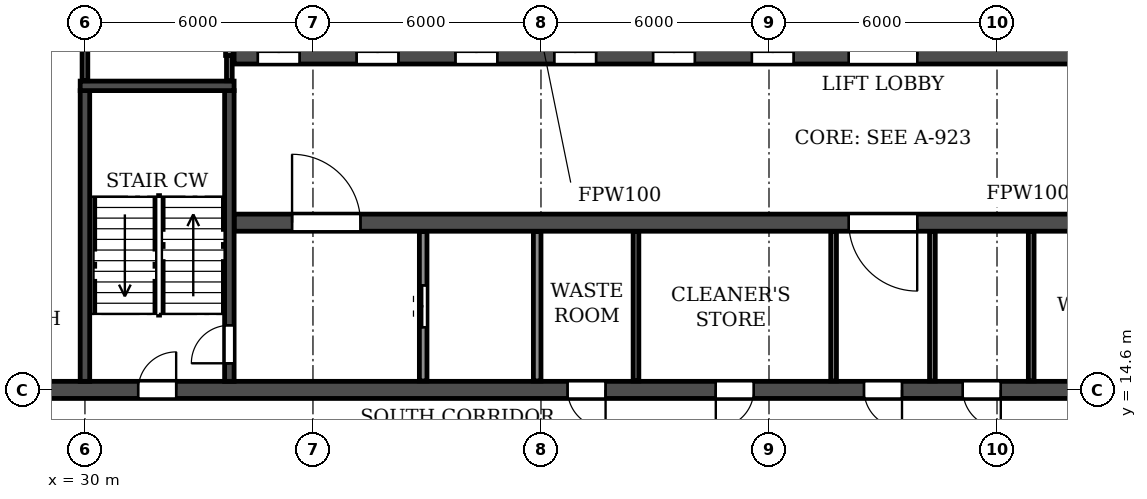
"""IFC4 building model, lengths in metres.
Left out: names, types, materials, properties, quantities, classifications, styles, units other than length and angle.
Written with IfcOpenShell. Run it as: python <this file> out.ifc"""

import sys

from ifc_helpers import new_model, si_unit, direction, frame, frame_2d, origin, place, context, subcontext, project, spatial, rectangle, extrude, element, fill, save


model = new_model("IFC4")
c1 = context("Model", 3, precision=1e-05, world=origin(), true_north=direction((0.0, 1.0)))
c2 = subcontext(c1, "Body", "Model", "MODEL_VIEW")
j1 = project(units=[si_unit("LENGTHUNIT", "METRE"), si_unit("PLANEANGLEUNIT", "RADIAN")], contexts=[c1])
p1 = place(None, origin())
s1 = spatial("IfcSite", under=j1, at=p1, CompositionType="ELEMENT")
p2 = place(p1, origin())
s2 = spatial("IfcBuilding", under=s1, at=p2, CompositionType="ELEMENT")
p3 = place(p2, frame((0.0, 0.0, 122.4)))
s3 = spatial("IfcBuildingStorey", under=s2, at=p3, CompositionType="ELEMENT", Elevation=122.4)
p4 = place(p3, frame((12.2, 14.6, 0.0), z_axis=(0.0, 0.0, 1.0), x_axis=(1.0, 0.0, 0.0)))
e1 = element("IfcWall", 1, at=p4, inside=s3, PredefinedType="SOLIDWALL", context=c2, shape_type="SweptSolid", body=[
    extrude(rectangle(XDim=77.6, YDim=0.45, at=frame_2d((38.8, 0.0))), origin(), (0.0, 0.0, 1.0), 3.07),
])
p5 = place(p4, frame((0.8, 0.0, 0.0)))
e2 = element("IfcOpeningElement", 2, at=p5, cuts=e1, PredefinedType="OPENING", context=c2, shape_type="SweptSolid", body=[
    extrude(rectangle(XDim=1.0, YDim=2.1, at=frame_2d((0.5, 1.05))), frame((0.0, 0.235, 0.0), z_axis=(0.0, -1.0, 0.0), x_axis=(1.0, 0.0, 0.0)), (0.0, 0.0, 1.0), 0.47),
])
p6 = place(p4, frame((3.8, 0.0, 0.0)))
e3 = element("IfcOpeningElement", 3, at=p6, cuts=e1, PredefinedType="OPENING", context=c2, shape_type="SweptSolid", body=[
    extrude(rectangle(XDim=1.0, YDim=2.1, at=frame_2d((0.5, 1.05))), frame((0.0, 0.235, 0.0), z_axis=(0.0, -1.0, 0.0), x_axis=(1.0, 0.0, 0.0)), (0.0, 0.0, 1.0), 0.47),
])
p7 = place(p4, frame((6.7, 0.0, 0.0)))
e4 = element("IfcOpeningElement", 4, at=p7, cuts=e1, PredefinedType="OPENING", context=c2, shape_type="SweptSolid", body=[
    extrude(rectangle(XDim=1.0, YDim=2.1, at=frame_2d((0.5, 1.05))), frame((0.0, 0.235, 0.0), z_axis=(0.0, -1.0, 0.0), x_axis=(1.0, 0.0, 0.0)), (0.0, 0.0, 1.0), 0.47),
])
p8 = place(p4, frame((14.6, 0.0, 0.0)))
e5 = element("IfcOpeningElement", 5, at=p8, cuts=e1, PredefinedType="OPENING", context=c2, shape_type="SweptSolid", body=[
    extrude(rectangle(XDim=1.0, YDim=2.1, at=frame_2d((0.5, 1.05))), frame((0.0, 0.235, 0.0), z_axis=(0.0, -1.0, 0.0), x_axis=(1.0, 0.0, 0.0)), (0.0, 0.0, 1.0), 0.47),
])
p9 = place(p4, frame((19.2, 0.0, 0.0)))
e6 = element("IfcOpeningElement", 6, at=p9, cuts=e1, PredefinedType="OPENING", context=c2, shape_type="SweptSolid", body=[
    extrude(rectangle(XDim=1.0, YDim=2.1, at=frame_2d((0.5, 1.05))), frame((0.0, 0.235, 0.0), z_axis=(0.0, -1.0, 0.0), x_axis=(1.0, 0.0, 0.0)), (0.0, 0.0, 1.0), 0.47),
])
p10 = place(p4, frame((30.5, 0.0, 0.0)))
e7 = element("IfcOpeningElement", 7, at=p10, cuts=e1, PredefinedType="OPENING", context=c2, shape_type="SweptSolid", body=[
    extrude(rectangle(XDim=1.0, YDim=2.1, at=frame_2d((0.5, 1.05))), frame((0.0, 0.235, 0.0), z_axis=(0.0, -1.0, 0.0), x_axis=(1.0, 0.0, 0.0)), (0.0, 0.0, 1.0), 0.47),
])
p11 = place(p4, frame((34.4, 0.0, 0.0)))
e8 = element("IfcOpeningElement", 8, at=p11, cuts=e1, PredefinedType="OPENING", context=c2, shape_type="SweptSolid", body=[
    extrude(rectangle(XDim=1.0, YDim=2.1, at=frame_2d((0.5, 1.05))), frame((0.0, 0.235, 0.0), z_axis=(0.0, -1.0, 0.0), x_axis=(1.0, 0.0, 0.0)), (0.0, 0.0, 1.0), 0.47),
])
p12 = place(p4, frame((38.3, 0.0, 0.0)))
e9 = element("IfcOpeningElement", 9, at=p12, cuts=e1, PredefinedType="OPENING", context=c2, shape_type="SweptSolid", body=[
    extrude(rectangle(XDim=1.0, YDim=2.1, at=frame_2d((0.5, 1.05))), frame((0.0, 0.235, 0.0), z_axis=(0.0, -1.0, 0.0), x_axis=(1.0, 0.0, 0.0)), (0.0, 0.0, 1.0), 0.47),
])
p13 = place(p4, frame((40.9, 0.0, 0.0)))
e10 = element("IfcOpeningElement", 10, at=p13, cuts=e1, PredefinedType="OPENING", context=c2, shape_type="SweptSolid", body=[
    extrude(rectangle(XDim=1.0, YDim=2.1, at=frame_2d((0.5, 1.05))), frame((0.0, 0.235, 0.0), z_axis=(0.0, -1.0, 0.0), x_axis=(1.0, 0.0, 0.0)), (0.0, 0.0, 1.0), 0.47),
])
p14 = place(p4, frame((44.8, 0.0, 0.0)))
e11 = element("IfcOpeningElement", 11, at=p14, cuts=e1, PredefinedType="OPENING", context=c2, shape_type="SweptSolid", body=[
    extrude(rectangle(XDim=1.0, YDim=2.1, at=frame_2d((0.5, 1.05))), frame((0.0, 0.235, 0.0), z_axis=(0.0, -1.0, 0.0), x_axis=(1.0, 0.0, 0.0)), (0.0, 0.0, 1.0), 0.47),
])
p15 = place(p4, frame((57.4, 0.0, 0.0)))
e12 = element("IfcOpeningElement", 12, at=p15, cuts=e1, PredefinedType="OPENING", context=c2, shape_type="SweptSolid", body=[
    extrude(rectangle(XDim=1.0, YDim=2.1, at=frame_2d((0.5, 1.05))), frame((0.0, 0.235, 0.0), z_axis=(0.0, -1.0, 0.0), x_axis=(1.0, 0.0, 0.0)), (0.0, 0.0, 1.0), 0.47),
])
p16 = place(p4, frame((62.0, 0.0, 0.0)))
e13 = element("IfcOpeningElement", 13, at=p16, cuts=e1, PredefinedType="OPENING", context=c2, shape_type="SweptSolid", body=[
    extrude(rectangle(XDim=1.0, YDim=2.1, at=frame_2d((0.5, 1.05))), frame((0.0, 0.235, 0.0), z_axis=(0.0, -1.0, 0.0), x_axis=(1.0, 0.0, 0.0)), (0.0, 0.0, 1.0), 0.47),
])
p17 = place(p4, frame((69.9, 0.0, 0.0)))
e14 = element("IfcOpeningElement", 14, at=p17, cuts=e1, PredefinedType="OPENING", context=c2, shape_type="SweptSolid", body=[
    extrude(rectangle(XDim=1.0, YDim=2.1, at=frame_2d((0.5, 1.05))), frame((0.0, 0.235, 0.0), z_axis=(0.0, -1.0, 0.0), x_axis=(1.0, 0.0, 0.0)), (0.0, 0.0, 1.0), 0.47),
])
p18 = place(p4, frame((72.8, 0.0, 0.0)))
e15 = element("IfcOpeningElement", 15, at=p18, cuts=e1, PredefinedType="OPENING", context=c2, shape_type="SweptSolid", body=[
    extrude(rectangle(XDim=1.0, YDim=2.1, at=frame_2d((0.5, 1.05))), frame((0.0, 0.235, 0.0), z_axis=(0.0, -1.0, 0.0), x_axis=(1.0, 0.0, 0.0)), (0.0, 0.0, 1.0), 0.47),
])
p19 = place(p4, frame((75.8, 0.0, 0.0)))
e16 = element("IfcOpeningElement", 16, at=p19, cuts=e1, PredefinedType="OPENING", context=c2, shape_type="SweptSolid", body=[
    extrude(rectangle(XDim=1.0, YDim=2.1, at=frame_2d((0.5, 1.05))), frame((0.0, 0.235, 0.0), z_axis=(0.0, -1.0, 0.0), x_axis=(1.0, 0.0, 0.0)), (0.0, 0.0, 1.0), 0.47),
])
p20 = place(p3, frame((33.925, 19.0, 0.0), z_axis=(0.0, 0.0, 1.0), x_axis=(1.0, 0.0, 0.0)))
e17 = element("IfcWall", 17, at=p20, inside=s3, PredefinedType="SOLIDWALL", context=c2, shape_type="SweptSolid", body=[
    extrude(rectangle(XDim=34.15, YDim=0.45, at=frame_2d((17.075, 0.0))), origin(), (0.0, 0.0, 1.0), 3.07),
])
p21 = place(p20, frame((16.175, 0.0, 0.0)))
e18 = element("IfcOpeningElement", 18, at=p21, cuts=e17, PredefinedType="OPENING", context=c2, shape_type="SweptSolid", body=[
    extrude(rectangle(XDim=1.8, YDim=2.1, at=frame_2d((0.9, 1.05))), frame((0.0, 0.235, 0.0), z_axis=(0.0, -1.0, 0.0), x_axis=(1.0, 0.0, 0.0)), (0.0, 0.0, 1.0), 0.47),
])
p22 = place(p20, frame((1.525, 0.0, 0.0)))
e19 = element("IfcOpeningElement", 19, at=p22, cuts=e17, PredefinedType="OPENING", context=c2, shape_type="SweptSolid", body=[
    extrude(rectangle(XDim=1.8, YDim=2.1, at=frame_2d((0.9, 1.05))), frame((0.0, 0.235, 0.0), z_axis=(0.0, -1.0, 0.0), x_axis=(1.0, 0.0, 0.0)), (0.0, 0.0, 1.0), 0.47),
])
p23 = place(p20, frame((30.825, 0.0, 0.0)))
e20 = element("IfcOpeningElement", 20, at=p23, cuts=e17, PredefinedType="OPENING", context=c2, shape_type="SweptSolid", body=[
    extrude(rectangle(XDim=1.8, YDim=2.1, at=frame_2d((0.9, 1.05))), frame((0.0, 0.235, 0.0), z_axis=(0.0, -1.0, 0.0), x_axis=(1.0, 0.0, 0.0)), (0.0, 0.0, 1.0), 0.47),
])
p24 = place(p3, frame((33.925, 23.4, 0.0), z_axis=(0.0, 0.0, 1.0), x_axis=(1.0, 0.0, 0.0)))
e21 = element("IfcWall", 21, at=p24, inside=s3, PredefinedType="SOLIDWALL", context=c2, shape_type="SweptSolid", body=[
    extrude(rectangle(XDim=34.15, YDim=0.45, at=frame_2d((17.075, 0.0))), origin(), (0.0, 0.0, 1.0), 3.07),
])
p25 = place(p24, frame((16.175, 0.0, 0.0)))
e22 = element("IfcOpeningElement", 22, at=p25, cuts=e21, PredefinedType="OPENING", context=c2, shape_type="SweptSolid", body=[
    extrude(rectangle(XDim=1.8, YDim=2.1, at=frame_2d((0.9, 1.05))), frame((0.0, 0.235, 0.0), z_axis=(0.0, -1.0, 0.0), x_axis=(1.0, 0.0, 0.0)), (0.0, 0.0, 1.0), 0.47),
])
p26 = place(p24, frame((0.625, 0.0, 0.0)))
e23 = element("IfcOpeningElement", 23, at=p26, cuts=e21, PredefinedType="OPENING", context=c2, shape_type="SweptSolid", body=[
    extrude(rectangle(XDim=1.1, YDim=2.1, at=frame_2d((0.55, 1.05))), frame((0.0, 0.235, 0.0), z_axis=(0.0, -1.0, 0.0), x_axis=(1.0, 0.0, 0.0)), (0.0, 0.0, 1.0), 0.47),
])
p27 = place(p24, frame((3.225, 0.0, 0.0)))
e24 = element("IfcOpeningElement", 24, at=p27, cuts=e21, PredefinedType="OPENING", context=c2, shape_type="SweptSolid", body=[
    extrude(rectangle(XDim=1.1, YDim=2.1, at=frame_2d((0.55, 1.05))), frame((0.0, 0.235, 0.0), z_axis=(0.0, -1.0, 0.0), x_axis=(1.0, 0.0, 0.0)), (0.0, 0.0, 1.0), 0.47),
])
p28 = place(p24, frame((5.825, 0.0, 0.0)))
e25 = element("IfcOpeningElement", 25, at=p28, cuts=e21, PredefinedType="OPENING", context=c2, shape_type="SweptSolid", body=[
    extrude(rectangle(XDim=1.1, YDim=2.1, at=frame_2d((0.55, 1.05))), frame((0.0, 0.235, 0.0), z_axis=(0.0, -1.0, 0.0), x_axis=(1.0, 0.0, 0.0)), (0.0, 0.0, 1.0), 0.47),
])
p29 = place(p24, frame((8.425, 0.0, 0.0)))
e26 = element("IfcOpeningElement", 26, at=p29, cuts=e21, PredefinedType="OPENING", context=c2, shape_type="SweptSolid", body=[
    extrude(rectangle(XDim=1.1, YDim=2.1, at=frame_2d((0.55, 1.05))), frame((0.0, 0.235, 0.0), z_axis=(0.0, -1.0, 0.0), x_axis=(1.0, 0.0, 0.0)), (0.0, 0.0, 1.0), 0.47),
])
p30 = place(p24, frame((11.025, 0.0, 0.0)))
e27 = element("IfcOpeningElement", 27, at=p30, cuts=e21, PredefinedType="OPENING", context=c2, shape_type="SweptSolid", body=[
    extrude(rectangle(XDim=1.1, YDim=2.1, at=frame_2d((0.55, 1.05))), frame((0.0, 0.235, 0.0), z_axis=(0.0, -1.0, 0.0), x_axis=(1.0, 0.0, 0.0)), (0.0, 0.0, 1.0), 0.47),
])
p31 = place(p24, frame((13.625, 0.0, 0.0)))
e28 = element("IfcOpeningElement", 28, at=p31, cuts=e21, PredefinedType="OPENING", context=c2, shape_type="SweptSolid", body=[
    extrude(rectangle(XDim=1.1, YDim=2.1, at=frame_2d((0.55, 1.05))), frame((0.0, 0.235, 0.0), z_axis=(0.0, -1.0, 0.0), x_axis=(1.0, 0.0, 0.0)), (0.0, 0.0, 1.0), 0.47),
])
p32 = place(p24, frame((27.225, 0.0, 0.0)))
e29 = element("IfcOpeningElement", 29, at=p32, cuts=e21, PredefinedType="OPENING", context=c2, shape_type="SweptSolid", body=[
    extrude(rectangle(XDim=1.1, YDim=2.1, at=frame_2d((0.55, 1.05))), frame((0.0, 0.235, 0.0), z_axis=(0.0, -1.0, 0.0), x_axis=(1.0, 0.0, 0.0)), (0.0, 0.0, 1.0), 0.47),
])
p33 = place(p3, frame((30.0, 14.825, 0.0), z_axis=(0.0, 0.0, 1.0), x_axis=(0.0, 1.0, 0.0)))
e30 = element("IfcWall", 30, at=p33, inside=s3, PredefinedType="SOLIDWALL", context=c2, shape_type="SweptSolid", body=[
    extrude(rectangle(XDim=7.65, YDim=0.25, at=frame_2d((3.825, 0.0))), origin(), (0.0, 0.0, 1.0), 3.07),
])
p34 = place(p3, frame((33.8, 14.825, 0.0), z_axis=(0.0, 0.0, 1.0), x_axis=(0.0, 1.0, 0.0)))
e31 = element("IfcWall", 31, at=p34, inside=s3, PredefinedType="SOLIDWALL", context=c2, shape_type="SweptSolid", body=[
    extrude(rectangle(XDim=7.65, YDim=0.25, at=frame_2d((3.825, 0.0))), origin(), (0.0, 0.0, 1.0), 3.07),
])
p35 = place(p34, frame((0.475, 0.0, 0.0)))
e32 = element("IfcOpeningElement", 32, at=p35, cuts=e31, PredefinedType="OPENING", context=c2, shape_type="SweptSolid", body=[
    extrude(rectangle(XDim=1.0, YDim=2.1, at=frame_2d((0.5, 1.05))), frame((0.0, 0.135, 0.0), z_axis=(0.0, -1.0, 0.0), x_axis=(1.0, 0.0, 0.0)), (0.0, 0.0, 1.0), 0.27),
])
p36 = place(p3, frame((29.875, 22.6, 0.0), z_axis=(0.0, 0.0, 1.0), x_axis=(1.0, 0.0, 0.0)))
e33 = element("IfcWall", 33, at=p36, inside=s3, PredefinedType="SOLIDWALL", context=c2, shape_type="SweptSolid", body=[
    extrude(rectangle(XDim=4.05, YDim=0.25, at=frame_2d((2.025, 0.0))), origin(), (0.0, 0.0, 1.0), 3.07),
])
for number, where, z_axis, x_axis in (
    (34, (49.7, 14.835, 0.0), (0.0, 0.0, 1.0), (0.0, 1.0, 0.0)),
    (35, (52.3, 14.835, 0.0), (0.0, 0.0, 1.0), (0.0, 1.0, 0.0)),
    (36, (44.5, 14.835, 0.0), (0.0, 0.0, 1.0), (0.0, 1.0, 0.0)),
    (37, (54.9, 14.835, 0.0), (0.0, 0.0, 1.0), (0.0, 1.0, 0.0)),
):
    element("IfcWall", number, at=place(p3, frame(where, z_axis=z_axis, x_axis=x_axis)), inside=s3, PredefinedType="PARTITIONING", context=c2, shape_type="SweptSolid", body=[
        extrude(rectangle(XDim=3.93, YDim=0.15, at=frame_2d((1.965, 0.0))), origin(), (0.0, 0.0, 1.0), 3.07),
    ])
p37 = place(p3, frame((30.0, 22.735, 0.0), z_axis=(0.0, 0.0, 1.0), x_axis=(0.0, 1.0, 0.0)))
e38 = element("IfcWall", 38, at=p37, inside=s3, PredefinedType="PARTITIONING", context=c2, shape_type="SweptSolid", body=[
    extrude(rectangle(XDim=4.83, YDim=0.15, at=frame_2d((2.415, 0.0))), origin(), (0.0, 0.0, 1.0), 3.07),
])
p38 = place(p3, frame((33.8, 22.735, 0.0), z_axis=(0.0, 0.0, 1.0), x_axis=(0.0, 1.0, 0.0)))
e39 = element("IfcWall", 39, at=p38, inside=s3, PredefinedType="PARTITIONING", context=c2, shape_type="SweptSolid", body=[
    extrude(rectangle(XDim=0.665, YDim=0.15, at=frame_2d((0.333, 0.0))), origin(), (0.0, 0.0, 1.0), 3.07),
])
p39 = place(p3, frame((33.8, 23.4, 0.0), z_axis=(0.0, 0.0, 1.0), x_axis=(0.0, 1.0, 0.0)))
e40 = element("IfcWall", 40, at=p39, inside=s3, PredefinedType="PARTITIONING", context=c2, shape_type="SweptSolid", body=[
    extrude(rectangle(XDim=2.7, YDim=0.2, at=frame_2d((1.35, 0.0))), origin(), (0.0, 0.0, 1.0), 3.07),
])
p40 = place(p3, frame((38.9, 14.835, 0.0), z_axis=(0.0, 0.0, 1.0), x_axis=(0.0, 1.0, 0.0)))
e41 = element("IfcWall", 41, at=p40, inside=s3, PredefinedType="PARTITIONING", context=c2, shape_type="SweptSolid", body=[
    extrude(rectangle(XDim=3.93, YDim=0.2, at=frame_2d((1.965, 0.0))), origin(), (0.0, 0.0, 1.0), 3.07),
])
p41 = place(p40, frame((1.415, 0.0, 0.0)))
e42 = element("IfcOpeningElement", 42, at=p41, cuts=e41, PredefinedType="OPENING", context=c2, shape_type="SweptSolid", body=[
    extrude(rectangle(XDim=1.1, YDim=2.1, at=frame_2d((0.55, 1.05))), frame((0.0, 0.11, 0.0), z_axis=(0.0, -1.0, 0.0), x_axis=(1.0, 0.0, 0.0)), (0.0, 0.0, 1.0), 0.22),
])
p42 = place(p3, frame((41.9, 14.835, 0.0), z_axis=(0.0, 0.0, 1.0), x_axis=(0.0, 1.0, 0.0)))
e43 = element("IfcWall", 43, at=p42, inside=s3, PredefinedType="PARTITIONING", context=c2, shape_type="SweptSolid", body=[
    extrude(rectangle(XDim=3.93, YDim=0.2, at=frame_2d((1.965, 0.0))), origin(), (0.0, 0.0, 1.0), 3.07),
])
p43 = place(p9, origin())
e44 = element("IfcDoor", 44, at=p43, inside=s3, OperationType="SINGLE_SWING_RIGHT", PredefinedType="DOOR", context=c2, shape_type="SweptSolid", body=[
    extrude(rectangle(XDim=1.0, YDim=2.1, at=frame_2d((0.5, 1.05))), frame((0.0, 0.025, 0.0), z_axis=(0.0, -1.0, 0.0), x_axis=(1.0, 0.0, 0.0)), (0.0, 0.0, 1.0), 0.05),
])
fill(e6, e44)
p44 = place(p10, frame((1.0, 0.0, 0.0), z_axis=(0.0, 0.0, 1.0), x_axis=(-1.0, 0.0, 0.0)))
e45 = element("IfcDoor", 45, at=p44, inside=s3, OperationType="SINGLE_SWING_LEFT", PredefinedType="DOOR", context=c2, shape_type="SweptSolid", body=[
    extrude(rectangle(XDim=1.0, YDim=2.1, at=frame_2d((0.5, 1.05))), frame((0.0, 0.025, 0.0), z_axis=(0.0, -1.0, 0.0), x_axis=(1.0, 0.0, 0.0)), (0.0, 0.0, 1.0), 0.05),
])
fill(e7, e45)
p45 = place(p11, frame((1.0, 0.0, 0.0), z_axis=(0.0, 0.0, 1.0), x_axis=(-1.0, 0.0, 0.0)))
e46 = element("IfcDoor", 46, at=p45, inside=s3, OperationType="SINGLE_SWING_RIGHT", PredefinedType="DOOR", context=c2, shape_type="SweptSolid", body=[
    extrude(rectangle(XDim=1.0, YDim=2.1, at=frame_2d((0.5, 1.05))), frame((0.0, 0.025, 0.0), z_axis=(0.0, -1.0, 0.0), x_axis=(1.0, 0.0, 0.0)), (0.0, 0.0, 1.0), 0.05),
])
fill(e8, e46)
p46 = place(p12, frame((1.0, 0.0, 0.0), z_axis=(0.0, 0.0, 1.0), x_axis=(-1.0, 0.0, 0.0)))
e47 = element("IfcDoor", 47, at=p46, inside=s3, OperationType="SINGLE_SWING_LEFT", PredefinedType="DOOR", context=c2, shape_type="SweptSolid", body=[
    extrude(rectangle(XDim=1.0, YDim=2.1, at=frame_2d((0.5, 1.05))), frame((0.0, 0.025, 0.0), z_axis=(0.0, -1.0, 0.0), x_axis=(1.0, 0.0, 0.0)), (0.0, 0.0, 1.0), 0.05),
])
fill(e9, e47)
p47 = place(p13, frame((1.0, 0.0, 0.0), z_axis=(0.0, 0.0, 1.0), x_axis=(-1.0, 0.0, 0.0)))
e48 = element("IfcDoor", 48, at=p47, inside=s3, OperationType="SINGLE_SWING_LEFT", PredefinedType="DOOR", context=c2, shape_type="SweptSolid", body=[
    extrude(rectangle(XDim=1.0, YDim=2.1, at=frame_2d((0.5, 1.05))), frame((0.0, 0.025, 0.0), z_axis=(0.0, -1.0, 0.0), x_axis=(1.0, 0.0, 0.0)), (0.0, 0.0, 1.0), 0.05),
])
fill(e10, e48)
p48 = place(p35, origin())
e49 = element("IfcDoor", 49, at=p48, inside=s3, OperationType="SINGLE_SWING_LEFT", PredefinedType="DOOR", context=c2, shape_type="SweptSolid", body=[
    extrude(rectangle(XDim=1.0, YDim=2.1, at=frame_2d((0.5, 1.05))), frame((0.0, 0.025, 0.0), z_axis=(0.0, -1.0, 0.0), x_axis=(1.0, 0.0, 0.0)), (0.0, 0.0, 1.0), 0.05),
])
fill(e32, e49)
p49 = place(p41, origin())
e50 = element("IfcDoor", 50, at=p49, inside=s3, OperationType="DOUBLE_DOOR_SLIDING", PredefinedType="DOOR", context=c2, shape_type="SweptSolid", body=[
    extrude(rectangle(XDim=1.1, YDim=2.1, at=frame_2d((0.55, 1.05))), frame((0.0, 0.025, 0.0), z_axis=(0.0, -1.0, 0.0), x_axis=(1.0, 0.0, 0.0)), (0.0, 0.0, 1.0), 0.05),
])
fill(e42, e50)
p50 = place(p25, origin())
e51 = element("IfcDoor", 51, at=p50, inside=s3, OperationType="DOUBLE_DOOR_SINGLE_SWING", PredefinedType="DOOR", context=c2, shape_type="SweptSolid", body=[
    extrude(rectangle(XDim=1.8, YDim=2.1, at=frame_2d((0.9, 1.05))), frame((0.0, 0.025, 0.0), z_axis=(0.0, -1.0, 0.0), x_axis=(1.0, 0.0, 0.0)), (0.0, 0.0, 1.0), 0.05),
])
fill(e22, e51)
p51 = place(p21, frame((1.8, 0.0, 0.0), z_axis=(0.0, 0.0, 1.0), x_axis=(-1.0, 0.0, 0.0)))
e52 = element("IfcDoor", 52, at=p51, inside=s3, OperationType="DOUBLE_DOOR_SINGLE_SWING", PredefinedType="DOOR", context=c2, shape_type="SweptSolid", body=[
    extrude(rectangle(XDim=1.8, YDim=2.1, at=frame_2d((0.9, 1.05))), frame((0.0, 0.025, 0.0), z_axis=(0.0, -1.0, 0.0), x_axis=(1.0, 0.0, 0.0)), (0.0, 0.0, 1.0), 0.05),
])
fill(e18, e52)
p52 = place(p26, origin())
e53 = element("IfcDoor", 53, at=p52, inside=s3, OperationType="DOUBLE_DOOR_SLIDING", PredefinedType="DOOR", context=c2, shape_type="SweptSolid", body=[
    extrude(rectangle(XDim=1.1, YDim=2.1, at=frame_2d((0.55, 1.05))), frame((0.0, 0.025, 0.0), z_axis=(0.0, -1.0, 0.0), x_axis=(1.0, 0.0, 0.0)), (0.0, 0.0, 1.0), 0.05),
])
fill(e23, e53)
p53 = place(p22, origin())
e54 = element("IfcDoor", 54, at=p53, inside=s3, OperationType="DOUBLE_DOOR_SINGLE_SWING", PredefinedType="DOOR", context=c2, shape_type="SweptSolid", body=[
    extrude(rectangle(XDim=1.8, YDim=2.1, at=frame_2d((0.9, 1.05))), frame((0.0, 0.025, 0.0), z_axis=(0.0, -1.0, 0.0), x_axis=(1.0, 0.0, 0.0)), (0.0, 0.0, 1.0), 0.05),
])
fill(e19, e54)
p54 = place(p27, origin())
e55 = element("IfcDoor", 55, at=p54, inside=s3, OperationType="DOUBLE_DOOR_SLIDING", PredefinedType="DOOR", context=c2, shape_type="SweptSolid", body=[
    extrude(rectangle(XDim=1.1, YDim=2.1, at=frame_2d((0.55, 1.05))), frame((0.0, 0.025, 0.0), z_axis=(0.0, -1.0, 0.0), x_axis=(1.0, 0.0, 0.0)), (0.0, 0.0, 1.0), 0.05),
])
fill(e24, e55)
p55 = place(p28, origin())
e56 = element("IfcDoor", 56, at=p55, inside=s3, OperationType="DOUBLE_DOOR_SLIDING", PredefinedType="DOOR", context=c2, shape_type="SweptSolid", body=[
    extrude(rectangle(XDim=1.1, YDim=2.1, at=frame_2d((0.55, 1.05))), frame((0.0, 0.025, 0.0), z_axis=(0.0, -1.0, 0.0), x_axis=(1.0, 0.0, 0.0)), (0.0, 0.0, 1.0), 0.05),
])
fill(e25, e56)
p56 = place(p29, origin())
e57 = element("IfcDoor", 57, at=p56, inside=s3, OperationType="DOUBLE_DOOR_SLIDING", PredefinedType="DOOR", context=c2, shape_type="SweptSolid", body=[
    extrude(rectangle(XDim=1.1, YDim=2.1, at=frame_2d((0.55, 1.05))), frame((0.0, 0.025, 0.0), z_axis=(0.0, -1.0, 0.0), x_axis=(1.0, 0.0, 0.0)), (0.0, 0.0, 1.0), 0.05),
])
fill(e26, e57)
p57 = place(p30, origin())
e58 = element("IfcDoor", 58, at=p57, inside=s3, OperationType="DOUBLE_DOOR_SLIDING", PredefinedType="DOOR", context=c2, shape_type="SweptSolid", body=[
    extrude(rectangle(XDim=1.1, YDim=2.1, at=frame_2d((0.55, 1.05))), frame((0.0, 0.025, 0.0), z_axis=(0.0, -1.0, 0.0), x_axis=(1.0, 0.0, 0.0)), (0.0, 0.0, 1.0), 0.05),
])
fill(e27, e58)
p58 = place(p31, origin())
e59 = element("IfcDoor", 59, at=p58, inside=s3, OperationType="DOUBLE_DOOR_SLIDING", PredefinedType="DOOR", context=c2, shape_type="SweptSolid", body=[
    extrude(rectangle(XDim=1.1, YDim=2.1, at=frame_2d((0.55, 1.05))), frame((0.0, 0.025, 0.0), z_axis=(0.0, -1.0, 0.0), x_axis=(1.0, 0.0, 0.0)), (0.0, 0.0, 1.0), 0.05),
])
fill(e28, e59)
save(model, sys.argv[1])
